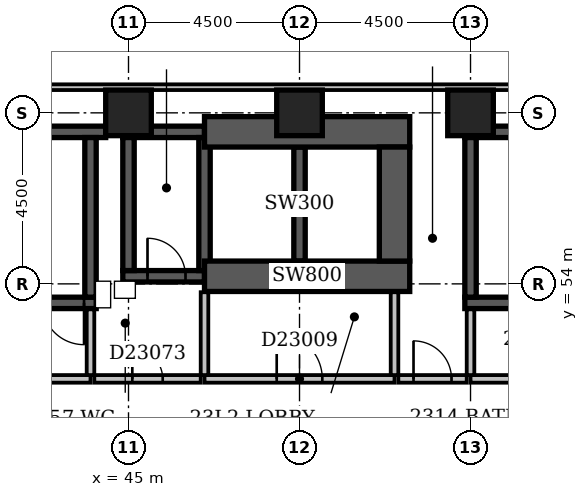
"""IFC4 building model, lengths in metres.
Left out: names, types, materials, properties, quantities, classifications, styles, units other than length and angle.
Written with IfcOpenShell. Run it as: python <this file> out.ifc"""

import sys

from ifc_helpers import new_model, si_unit, direction, frame, frame_2d, origin, origin_2d, place, context, subcontext, project, spatial, rectangle, extrude, element, fill, save


model = new_model("IFC4")
c1 = context("Model", 3, precision=1e-05, world=origin(), true_north=direction((0.0, 1.0)))
c2 = subcontext(c1, "Body", "Model", "MODEL_VIEW")
j1 = project(units=[si_unit("LENGTHUNIT", "METRE"), si_unit("PLANEANGLEUNIT", "RADIAN")], contexts=[c1])
p1 = place(None, origin())
s1 = spatial("IfcSite", under=j1, at=p1, CompositionType="ELEMENT")
p2 = place(p1, origin())
s2 = spatial("IfcBuilding", under=s1, at=p2, CompositionType="ELEMENT")
p3 = place(p2, frame((0.0, 0.0, 93.8)))
s3 = spatial("IfcBuildingStorey", under=s2, at=p3, CompositionType="ELEMENT", Elevation=93.8)
p4 = place(p3, frame((36.6, 58.0, -0.3), z_axis=(0.0, 0.0, 1.0), x_axis=(1.0, 0.0, 0.0)))
e1 = element("IfcWall", 1, at=p4, inside=s3, PredefinedType="SHEAR", context=c2, shape_type="SweptSolid", body=[
    extrude(rectangle(XDim=7.8, YDim=0.3, at=frame_2d((3.9, 0.0))), origin(), (0.0, 0.0, 1.0), 3.6),
])
p5 = place(p3, frame((37.15, 53.5, -0.3), z_axis=(0.0, 0.0, 1.0), x_axis=(1.0, 0.0, 0.0)))
e2 = element("IfcWall", 2, at=p5, inside=s3, PredefinedType="SHEAR", context=c2, shape_type="SweptSolid", body=[
    extrude(rectangle(XDim=7.0, YDim=0.3, at=frame_2d((3.5, 0.0))), origin(), (0.0, 0.0, 1.0), 3.6),
])
p6 = place(p5, frame((5.58, 0.0, 0.3)))
e3 = element("IfcOpeningElement", 3, at=p6, cuts=e2, PredefinedType="OPENING", context=c2, shape_type="SweptSolid", body=[
    extrude(rectangle(XDim=1.1, YDim=2.1, at=frame_2d((0.55, 1.05))), frame((0.0, 0.162, 0.0), z_axis=(0.0, -1.0, 0.0), x_axis=(1.0, 0.0, 0.0)), (0.0, 0.0, 1.0), 0.324),
])
p7 = place(p3, frame((44.0, 53.65, -0.3), z_axis=(0.0, 0.0, 1.0), x_axis=(0.0, 1.0, 0.0)))
e4 = element("IfcWall", 4, at=p7, inside=s3, PredefinedType="SHEAR", context=c2, shape_type="SweptSolid", body=[
    extrude(rectangle(XDim=4.2, YDim=0.3, at=frame_2d((2.1, 0.0))), origin(), (0.0, 0.0, 1.0), 3.6),
])
p8 = place(p3, frame((44.85, 54.2, -0.3), z_axis=(0.0, 0.0, 1.0), x_axis=(1.0, 0.0, 0.0)))
e5 = element("IfcWall", 5, at=p8, inside=s3, PredefinedType="SHEAR", context=c2, shape_type="SweptSolid", body=[
    extrude(rectangle(XDim=2.15, YDim=0.3, at=frame_2d((1.075, 0.0))), origin(), (0.0, 0.0, 1.0), 3.6),
])
p9 = place(p8, frame((0.65, 0.0, 0.3)))
e6 = element("IfcOpeningElement", 6, at=p9, cuts=e5, PredefinedType="OPENING", context=c2, shape_type="SweptSolid", body=[
    extrude(rectangle(XDim=1.0, YDim=2.1, at=frame_2d((0.5, 1.05))), frame((0.0, 0.162, 0.0), z_axis=(0.0, -1.0, 0.0), x_axis=(1.0, 0.0, 0.0)), (0.0, 0.0, 1.0), 0.324),
])
p10 = place(p3, frame((44.85, 58.0, -0.3), z_axis=(0.0, 0.0, 1.0), x_axis=(1.0, 0.0, 0.0)))
e7 = element("IfcWall", 7, at=p10, inside=s3, PredefinedType="SHEAR", context=c2, shape_type="SweptSolid", body=[
    extrude(rectangle(XDim=2.15, YDim=0.3, at=frame_2d((1.075, 0.0))), origin(), (0.0, 0.0, 1.0), 3.6),
])
p11 = place(p3, frame((45.0, 54.35, -0.3), z_axis=(0.0, 0.0, 1.0), x_axis=(0.0, 1.0, 0.0)))
e8 = element("IfcWall", 8, at=p11, inside=s3, PredefinedType="SHEAR", context=c2, shape_type="SweptSolid", body=[
    extrude(rectangle(XDim=3.5, YDim=0.3, at=frame_2d((1.75, 0.0))), origin(), (0.0, 0.0, 1.0), 3.6),
])
p12 = place(p3, frame((47.0, 54.2, -0.3), z_axis=(0.0, 0.0, 1.0), x_axis=(1.0, 0.0, 0.0)))
e9 = element("IfcWall", 9, at=p12, inside=s3, PredefinedType="SHEAR", context=c2, shape_type="SweptSolid", body=[
    extrude(rectangle(XDim=5.4, YDim=0.8, at=frame_2d((2.7, 0.0))), origin(), (0.0, 0.0, 1.0), 3.6),
])
p13 = place(p3, frame((47.0, 54.35, -0.3), z_axis=(0.0, 0.0, 1.0), x_axis=(0.0, 1.0, 0.0)))
e10 = element("IfcWall", 10, at=p13, inside=s3, PredefinedType="SHEAR", context=c2, shape_type="SweptSolid", body=[
    extrude(rectangle(XDim=3.5, YDim=0.3, at=frame_2d((1.75, 0.0))), origin(), (0.0, 0.0, 1.0), 3.6),
])
p14 = place(p3, frame((47.0, 58.0, -0.3), z_axis=(0.0, 0.0, 1.0), x_axis=(1.0, 0.0, 0.0)))
e11 = element("IfcWall", 11, at=p14, inside=s3, PredefinedType="SHEAR", context=c2, shape_type="SweptSolid", body=[
    extrude(rectangle(XDim=5.4, YDim=0.8, at=frame_2d((2.7, 0.0))), origin(), (0.0, 0.0, 1.0), 3.6),
])
p15 = place(p3, frame((49.5, 54.6, -0.3), z_axis=(0.0, 0.0, 1.0), x_axis=(0.0, 1.0, 0.0)))
e12 = element("IfcWall", 12, at=p15, inside=s3, PredefinedType="SHEAR", context=c2, shape_type="SweptSolid", body=[
    extrude(rectangle(XDim=3.0, YDim=0.3, at=frame_2d((1.5, 0.0))), origin(), (0.0, 0.0, 1.0), 3.6),
])
p16 = place(p3, frame((52.0, 54.6, -0.3), z_axis=(0.0, 0.0, 1.0), x_axis=(0.0, 1.0, 0.0)))
e13 = element("IfcWall", 13, at=p16, inside=s3, PredefinedType="SHEAR", context=c2, shape_type="SweptSolid", body=[
    extrude(rectangle(XDim=3.0, YDim=0.8, at=frame_2d((1.5, 0.0))), origin(), (0.0, 0.0, 1.0), 3.6),
])
p17 = place(p3, frame((53.85, 53.5, -0.3), z_axis=(0.0, 0.0, 1.0), x_axis=(1.0, 0.0, 0.0)))
e14 = element("IfcWall", 14, at=p17, inside=s3, PredefinedType="SHEAR", context=c2, shape_type="SweptSolid", body=[
    extrude(rectangle(XDim=7.0, YDim=0.3, at=frame_2d((3.5, 0.0))), origin(), (0.0, 0.0, 1.0), 3.6),
])
p18 = place(p17, frame((5.58, 0.0, 0.3)))
e15 = element("IfcOpeningElement", 15, at=p18, cuts=e14, PredefinedType="OPENING", context=c2, shape_type="SweptSolid", body=[
    extrude(rectangle(XDim=1.1, YDim=2.1, at=frame_2d((0.55, 1.05))), frame((0.0, 0.162, 0.0), z_axis=(0.0, -1.0, 0.0), x_axis=(1.0, 0.0, 0.0)), (0.0, 0.0, 1.0), 0.324),
])
p19 = place(p3, frame((53.85, 58.0, -0.3), z_axis=(0.0, 0.0, 1.0), x_axis=(1.0, 0.0, 0.0)))
e16 = element("IfcWall", 16, at=p19, inside=s3, PredefinedType="SHEAR", context=c2, shape_type="SweptSolid", body=[
    extrude(rectangle(XDim=7.0, YDim=0.3, at=frame_2d((3.5, 0.0))), origin(), (0.0, 0.0, 1.0), 3.6),
])
p20 = place(p3, frame((54.0, 53.65, -0.3), z_axis=(0.0, 0.0, 1.0), x_axis=(0.0, 1.0, 0.0)))
e17 = element("IfcWall", 17, at=p20, inside=s3, PredefinedType="SHEAR", context=c2, shape_type="SweptSolid", body=[
    extrude(rectangle(XDim=4.2, YDim=0.3, at=frame_2d((2.1, 0.0))), origin(), (0.0, 0.0, 1.0), 3.6),
])
for number, where, z_axis, x_axis in (
    (18, (45.0, 58.5, -0.3), (0.0, 0.0, 1.0), (1.0, 0.0, 0.0)),
    (19, (49.5, 58.5, -0.3), (0.0, 0.0, 1.0), (1.0, 0.0, 0.0)),
    (20, (54.0, 58.5, -0.3), (0.0, 0.0, 1.0), (1.0, 0.0, 0.0)),
):
    element("IfcColumn", number, at=place(p3, frame(where, z_axis=z_axis, x_axis=x_axis)), inside=s3, PredefinedType="COLUMN", context=c2, shape_type="SweptSolid", body=[
        extrude(rectangle(XDim=1.2, YDim=1.2, at=origin_2d()), origin(), (0.0, 0.0, 1.0), 3.6),
    ])
p21 = place(p3, frame((68.1, 59.175, 0.0), z_axis=(0.0, 0.0, 1.0), x_axis=(-1.0, 0.0, 0.0)))
e21 = element("IfcWall", 21, at=p21, inside=s3, PredefinedType="STANDARD", context=c2, shape_type="SweptSolid", body=[
    extrude(rectangle(XDim=68.85, YDim=0.15, at=frame_2d((34.425, 0.0))), origin(), (0.0, 0.0, 1.0), 2.7),
])
p22 = place(p21, frame((2.49, 0.0, 0.6)))
e22 = element("IfcOpeningElement", 22, at=p22, cuts=e21, PredefinedType="OPENING", context=c2, shape_type="SweptSolid", body=[
    extrude(rectangle(XDim=1.8, YDim=1.8, at=frame_2d((0.9, 0.9))), frame((0.0, 0.087, 0.0), z_axis=(0.0, -1.0, 0.0), x_axis=(1.0, 0.0, 0.0)), (0.0, 0.0, 1.0), 0.174),
])
p23 = place(p21, frame((6.15, 0.0, 0.6)))
e23 = element("IfcOpeningElement", 23, at=p23, cuts=e21, PredefinedType="OPENING", context=c2, shape_type="SweptSolid", body=[
    extrude(rectangle(XDim=2.4, YDim=1.8, at=frame_2d((1.2, 0.9))), frame((0.0, 0.087, 0.0), z_axis=(0.0, -1.0, 0.0), x_axis=(1.0, 0.0, 0.0)), (0.0, 0.0, 1.0), 0.174),
])
p24 = place(p3, frame((47.0, 51.5, 0.0), z_axis=(0.0, 0.0, 1.0), x_axis=(1.0, 0.0, 0.0)))
e24 = element("IfcWall", 24, at=p24, inside=s3, PredefinedType="PARTITIONING", context=c2, shape_type="SweptSolid", body=[
    extrude(rectangle(XDim=5.0, YDim=0.2, at=frame_2d((2.5, 0.0))), origin(), (0.0, 0.0, 1.0), 3.3),
])
p25 = place(p24, frame((1.9, 0.0, 0.0)))
e25 = element("IfcOpeningElement", 25, at=p25, cuts=e24, PredefinedType="OPENING", context=c2, shape_type="SweptSolid", body=[
    extrude(rectangle(XDim=1.2, YDim=2.1, at=frame_2d((0.6, 1.05))), frame((0.0, 0.112, 0.0), z_axis=(0.0, -1.0, 0.0), x_axis=(1.0, 0.0, 0.0)), (0.0, 0.0, 1.0), 0.224),
])
for number, where, z_axis, x_axis in (
    (26, (52.0, 51.6, 0.0), (0.0, 0.0, 1.0), (0.0, 1.0, 0.0)),
    (27, (47.0, 51.6, 0.0), (0.0, 0.0, 1.0), (0.0, 1.0, 0.0)),
):
    element("IfcWall", number, at=place(p3, frame(where, z_axis=z_axis, x_axis=x_axis)), inside=s3, PredefinedType="PARTITIONING", context=c2, shape_type="SweptSolid", body=[
        extrude(rectangle(XDim=2.18, YDim=0.2, at=frame_2d((1.09, 0.0))), origin(), (0.0, 0.0, 1.0), 3.3),
    ])
p26 = place(p3, frame((37.3, 51.5, 0.0), z_axis=(0.0, 0.0, 1.0), x_axis=(1.0, 0.0, 0.0)))
e28 = element("IfcWall", 28, at=p26, inside=s3, PredefinedType="PARTITIONING", context=c2, shape_type="SweptSolid", body=[
    extrude(rectangle(XDim=6.7, YDim=0.2, at=frame_2d((3.35, 0.0))), origin(), (0.0, 0.0, 1.0), 3.3),
])
p27 = place(p26, frame((2.75, 0.0, 0.0)))
e29 = element("IfcOpeningElement", 29, at=p27, cuts=e28, PredefinedType="OPENING", context=c2, shape_type="SweptSolid", body=[
    extrude(rectangle(XDim=1.2, YDim=2.1, at=frame_2d((0.6, 1.05))), frame((0.0, 0.112, 0.0), z_axis=(0.0, -1.0, 0.0), x_axis=(1.0, 0.0, 0.0)), (0.0, 0.0, 1.0), 0.224),
])
p28 = place(p3, frame((44.0, 51.6, 0.0), z_axis=(0.0, 0.0, 1.0), x_axis=(0.0, 1.0, 0.0)))
e30 = element("IfcWall", 30, at=p28, inside=s3, PredefinedType="PARTITIONING", context=c2, shape_type="SweptSolid", body=[
    extrude(rectangle(XDim=1.73, YDim=0.2, at=frame_2d((0.865, 0.0))), origin(), (0.0, 0.0, 1.0), 3.3),
])
p29 = place(p3, frame((54.0, 51.5, 0.0), z_axis=(0.0, 0.0, 1.0), x_axis=(1.0, 0.0, 0.0)))
e31 = element("IfcWall", 31, at=p29, inside=s3, PredefinedType="PARTITIONING", context=c2, shape_type="SweptSolid", body=[
    extrude(rectangle(XDim=6.7, YDim=0.2, at=frame_2d((3.35, 0.0))), origin(), (0.0, 0.0, 1.0), 3.3),
])
p30 = place(p29, frame((2.75, 0.0, 0.0)))
e32 = element("IfcOpeningElement", 32, at=p30, cuts=e31, PredefinedType="OPENING", context=c2, shape_type="SweptSolid", body=[
    extrude(rectangle(XDim=1.2, YDim=2.1, at=frame_2d((0.6, 1.05))), frame((0.0, 0.112, 0.0), z_axis=(0.0, -1.0, 0.0), x_axis=(1.0, 0.0, 0.0)), (0.0, 0.0, 1.0), 0.224),
])
p31 = place(p3, frame((54.0, 51.6, 0.0), z_axis=(0.0, 0.0, 1.0), x_axis=(0.0, 1.0, 0.0)))
e33 = element("IfcWall", 33, at=p31, inside=s3, PredefinedType="PARTITIONING", context=c2, shape_type="SweptSolid", body=[
    extrude(rectangle(XDim=1.73, YDim=0.2, at=frame_2d((0.865, 0.0))), origin(), (0.0, 0.0, 1.0), 2.6),
])
p32 = place(p3, frame((44.1, 51.5, 0.0), z_axis=(0.0, 0.0, 1.0), x_axis=(1.0, 0.0, 0.0)))
e34 = element("IfcWall", 34, at=p32, inside=s3, PredefinedType="PARTITIONING", context=c2, shape_type="SweptSolid", body=[
    extrude(rectangle(XDim=2.8, YDim=0.2, at=frame_2d((1.4, 0.0))), origin(), (0.0, 0.0, 1.0), 3.3),
])
p33 = place(p32, frame((1.0, 0.0, 0.0)))
e35 = element("IfcOpeningElement", 35, at=p33, cuts=e34, PredefinedType="OPENING", context=c2, shape_type="SweptSolid", body=[
    extrude(rectangle(XDim=0.8, YDim=2.1, at=frame_2d((0.4, 1.05))), frame((0.0, 0.112, 0.0), z_axis=(0.0, -1.0, 0.0), x_axis=(1.0, 0.0, 0.0)), (0.0, 0.0, 1.0), 0.224),
])
p34 = place(p3, frame((52.1, 51.5, 0.0), z_axis=(0.0, 0.0, 1.0), x_axis=(1.0, 0.0, 0.0)))
e36 = element("IfcWall", 36, at=p34, inside=s3, PredefinedType="PARTITIONING", context=c2, shape_type="SweptSolid", body=[
    extrude(rectangle(XDim=1.8, YDim=0.2, at=frame_2d((0.9, 0.0))), origin(), (0.0, 0.0, 1.0), 3.3),
])
p35 = place(p34, frame((0.4, 0.0, 0.0)))
e37 = element("IfcOpeningElement", 37, at=p35, cuts=e36, PredefinedType="OPENING", context=c2, shape_type="SweptSolid", body=[
    extrude(rectangle(XDim=1.0, YDim=2.1, at=frame_2d((0.5, 1.05))), frame((0.0, 0.112, 0.0), z_axis=(0.0, -1.0, 0.0), x_axis=(1.0, 0.0, 0.0)), (0.0, 0.0, 1.0), 0.224),
])
p36 = place(p25, origin())
e38 = element("IfcDoor", 38, at=p36, inside=s3, OperationType="SINGLE_SWING_LEFT", PredefinedType="DOOR", context=c2, shape_type="SweptSolid", body=[
    extrude(rectangle(XDim=1.2, YDim=2.1, at=frame_2d((0.6, 1.05))), frame((0.0, 0.025, 0.0), z_axis=(0.0, -1.0, 0.0), x_axis=(1.0, 0.0, 0.0)), (0.0, 0.0, 1.0), 0.05),
])
fill(e25, e38)
p37 = place(p9, origin())
e39 = element("IfcDoor", 39, at=p37, inside=s3, OperationType="SINGLE_SWING_LEFT", PredefinedType="DOOR", context=c2, shape_type="SweptSolid", body=[
    extrude(rectangle(XDim=1.0, YDim=2.1, at=frame_2d((0.5, 1.05))), frame((0.0, 0.025, 0.0), z_axis=(0.0, -1.0, 0.0), x_axis=(1.0, 0.0, 0.0)), (0.0, 0.0, 1.0), 0.05),
])
fill(e6, e39)
p38 = place(p6, origin())
e40 = element("IfcDoor", 40, at=p38, inside=s3, OperationType="SINGLE_SWING_RIGHT", PredefinedType="DOOR", context=c2, shape_type="SweptSolid", body=[
    extrude(rectangle(XDim=1.1, YDim=2.1, at=frame_2d((0.55, 1.05))), frame((0.0, 0.025, 0.0), z_axis=(0.0, -1.0, 0.0), x_axis=(1.0, 0.0, 0.0)), (0.0, 0.0, 1.0), 0.05),
])
fill(e3, e40)
p39 = place(p33, origin())
e41 = element("IfcDoor", 41, at=p39, inside=s3, OperationType="SINGLE_SWING_LEFT", PredefinedType="DOOR", context=c2, shape_type="SweptSolid", body=[
    extrude(rectangle(XDim=0.8, YDim=2.1, at=frame_2d((0.4, 1.05))), frame((0.0, 0.025, 0.0), z_axis=(0.0, -1.0, 0.0), x_axis=(1.0, 0.0, 0.0)), (0.0, 0.0, 1.0), 0.05),
])
fill(e35, e41)
p40 = place(p35, origin())
e42 = element("IfcDoor", 42, at=p40, inside=s3, OperationType="SINGLE_SWING_LEFT", PredefinedType="DOOR", context=c2, shape_type="SweptSolid", body=[
    extrude(rectangle(XDim=1.0, YDim=2.1, at=frame_2d((0.5, 1.05))), frame((0.0, 0.025, 0.0), z_axis=(0.0, -1.0, 0.0), x_axis=(1.0, 0.0, 0.0)), (0.0, 0.0, 1.0), 0.05),
])
fill(e37, e42)
save(model, sys.argv[1])
